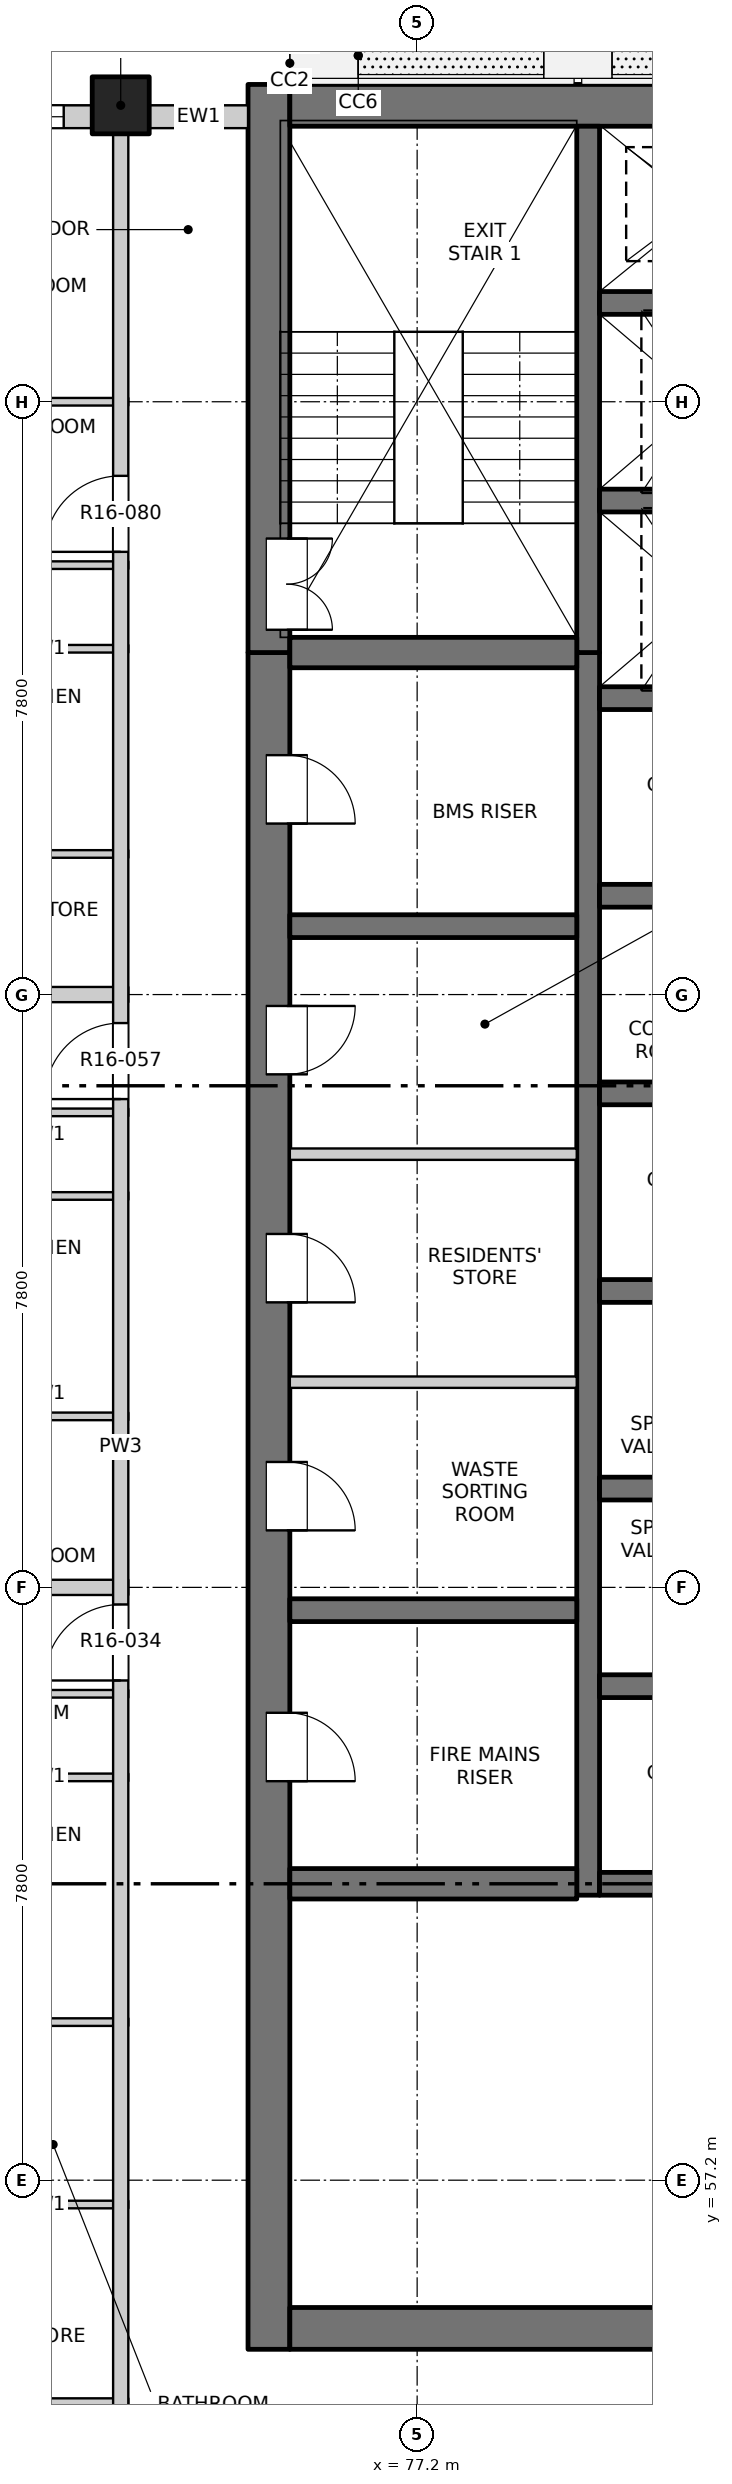
"""IFC4 building model, lengths in metres.
Left out: names, types, materials, properties, quantities, classifications, styles, units other than length and angle.
Written with IfcOpenShell. Run it as: python <this file> out.ifc"""

import sys

from ifc_helpers import new_model, si_unit, direction, frame, frame_2d, origin, origin_2d, place, context, subcontext, project, spatial, rectangle, extrude, element, fill, save


model = new_model("IFC4")
c1 = context("Model", 3, precision=1e-05, world=origin(), true_north=direction((0.0, 1.0)))
c2 = subcontext(c1, "Body", "Model", "MODEL_VIEW")
j1 = project(units=[si_unit("LENGTHUNIT", "METRE"), si_unit("PLANEANGLEUNIT", "RADIAN")], contexts=[c1])
p1 = place(None, origin())
s1 = spatial("IfcSite", under=j1, at=p1, CompositionType="ELEMENT")
p2 = place(p1, origin())
s2 = spatial("IfcBuilding", under=s1, at=p2, CompositionType="ELEMENT")
p3 = place(p2, frame((0.0, 0.0, 169.0)))
s3 = spatial("IfcBuildingStorey", under=s2, at=p3, CompositionType="ELEMENT", Elevation=169.0)
p4 = place(p3, frame((73.3, 84.5, -0.25), z_axis=(0.0, 0.0, 1.0), x_axis=(1.0, 0.0, 0.0)))
e1 = element("IfcColumn", 1, at=p4, inside=s3, PredefinedType="COLUMN", context=c2, shape_type="SweptSolid", body=[
    extrude(rectangle(XDim=0.75, YDim=0.75, at=origin_2d()), origin(), (0.0, 0.0, 1.0), 3.35),
])
p5 = place(p3, frame((75.25, 54.975, -0.25), z_axis=(0.0, 0.0, 1.0), x_axis=(0.0, 1.0, 0.0)))
e2 = element("IfcWall", 2, at=p5, inside=s3, PredefinedType="SOLIDWALL", context=c2, shape_type="SweptSolid", body=[
    extrude(rectangle(XDim=22.325, YDim=0.55, at=frame_2d((11.163, 0.0))), origin(), (0.0, 0.0, 1.0), 3.35),
])
p6 = place(p5, frame((7.475, 0.0, 0.25)))
e3 = element("IfcOpeningElement", 3, at=p6, cuts=e2, PredefinedType="OPENING", context=c2, shape_type="SweptSolid", body=[
    extrude(rectangle(XDim=0.9, YDim=2.1, at=frame_2d((0.45, 1.05))), frame((0.0, 0.285, 0.0), z_axis=(0.0, -1.0, 0.0), x_axis=(1.0, 0.0, 0.0)), (0.0, 0.0, 1.0), 0.57),
])
p7 = place(p5, frame((10.775, 0.0, 0.25)))
e4 = element("IfcOpeningElement", 4, at=p7, cuts=e2, PredefinedType="OPENING", context=c2, shape_type="SweptSolid", body=[
    extrude(rectangle(XDim=0.9, YDim=2.1, at=frame_2d((0.45, 1.05))), frame((0.0, 0.285, 0.0), z_axis=(0.0, -1.0, 0.0), x_axis=(1.0, 0.0, 0.0)), (0.0, 0.0, 1.0), 0.57),
])
p8 = place(p5, frame((13.775, 0.0, 0.25)))
e5 = element("IfcOpeningElement", 5, at=p8, cuts=e2, PredefinedType="OPENING", context=c2, shape_type="SweptSolid", body=[
    extrude(rectangle(XDim=0.9, YDim=2.1, at=frame_2d((0.45, 1.05))), frame((0.0, 0.285, 0.0), z_axis=(0.0, -1.0, 0.0), x_axis=(1.0, 0.0, 0.0)), (0.0, 0.0, 1.0), 0.57),
])
p9 = place(p5, frame((16.775, 0.0, 0.25)))
e6 = element("IfcOpeningElement", 6, at=p9, cuts=e2, PredefinedType="OPENING", context=c2, shape_type="SweptSolid", body=[
    extrude(rectangle(XDim=0.9, YDim=2.1, at=frame_2d((0.45, 1.05))), frame((0.0, 0.285, 0.0), z_axis=(0.0, -1.0, 0.0), x_axis=(1.0, 0.0, 0.0)), (0.0, 0.0, 1.0), 0.57),
])
p10 = place(p5, frame((20.075, 0.0, 0.25)))
e7 = element("IfcOpeningElement", 7, at=p10, cuts=e2, PredefinedType="OPENING", context=c2, shape_type="SweptSolid", body=[
    extrude(rectangle(XDim=0.9, YDim=2.1, at=frame_2d((0.45, 1.05))), frame((0.0, 0.285, 0.0), z_axis=(0.0, -1.0, 0.0), x_axis=(1.0, 0.0, 0.0)), (0.0, 0.0, 1.0), 0.57),
])
p11 = place(p3, frame((75.25, 77.3, -0.25), z_axis=(0.0, 0.0, 1.0), x_axis=(0.0, 1.0, 0.0)))
e8 = element("IfcWall", 8, at=p11, inside=s3, PredefinedType="SOLIDWALL", context=c2, shape_type="SweptSolid", body=[
    extrude(rectangle(XDim=7.475, YDim=0.55, at=frame_2d((3.737, 0.0))), origin(), (0.0, 0.0, 1.0), 3.35),
])
p12 = place(p11, frame((0.3, 0.0, 0.25)))
e9 = element("IfcOpeningElement", 9, at=p12, cuts=e8, PredefinedType="OPENING", context=c2, shape_type="SweptSolid", body=[
    extrude(rectangle(XDim=1.2, YDim=2.1, at=frame_2d((0.6, 1.05))), frame((0.0, 0.285, 0.0), z_axis=(0.0, -1.0, 0.0), x_axis=(1.0, 0.0, 0.0)), (0.0, 0.0, 1.0), 0.57),
])
p13 = place(p3, frame((75.525, 55.25, -0.25), z_axis=(0.0, 0.0, 1.0), x_axis=(1.0, 0.0, 0.0)))
e10 = element("IfcWall", 10, at=p13, inside=s3, PredefinedType="SOLIDWALL", context=c2, shape_type="SweptSolid", body=[
    extrude(rectangle(XDim=18.95, YDim=0.55, at=frame_2d((9.475, 0.0))), origin(), (0.0, 0.0, 1.0), 3.35),
])
p14 = place(p13, frame((8.725, 0.0, 0.25)))
e11 = element("IfcOpeningElement", 11, at=p14, cuts=e10, PredefinedType="OPENING", context=c2, shape_type="SweptSolid", body=[
    extrude(rectangle(XDim=1.5, YDim=2.1, at=frame_2d((0.75, 1.05))), frame((0.0, 0.285, 0.0), z_axis=(0.0, -1.0, 0.0), x_axis=(1.0, 0.0, 0.0)), (0.0, 0.0, 1.0), 0.57),
])
p15 = place(p3, frame((75.525, 84.5, -0.25), z_axis=(0.0, 0.0, 1.0), x_axis=(1.0, 0.0, 0.0)))
e12 = element("IfcWall", 12, at=p15, inside=s3, PredefinedType="SOLIDWALL", context=c2, shape_type="SweptSolid", body=[
    extrude(rectangle(XDim=18.95, YDim=0.55, at=frame_2d((9.475, 0.0))), origin(), (0.0, 0.0, 1.0), 3.35),
])
p16 = place(p3, frame((79.45, 60.95, -0.25), z_axis=(0.0, 0.0, 1.0), x_axis=(0.0, 1.0, 0.0)))
e13 = element("IfcWall", 13, at=p16, inside=s3, PredefinedType="SOLIDWALL", context=c2, shape_type="SweptSolid", body=[
    extrude(rectangle(XDim=16.35, YDim=0.3, at=frame_2d((8.175, 0.0))), origin(), (0.0, 0.0, 1.0), 3.35),
])
p17 = place(p3, frame((79.45, 77.3, -0.25), z_axis=(0.0, 0.0, 1.0), x_axis=(0.0, 1.0, 0.0)))
e14 = element("IfcWall", 14, at=p17, inside=s3, PredefinedType="SOLIDWALL", context=c2, shape_type="SweptSolid", body=[
    extrude(rectangle(XDim=6.925, YDim=0.3, at=frame_2d((3.462, 0.0))), origin(), (0.0, 0.0, 1.0), 3.35),
])
for number, where, z_axis, x_axis in (
    (15, (79.6, 61.1, -0.25), (0.0, 0.0, 1.0), (1.0, 0.0, 0.0)),
    (16, (79.6, 63.7, -0.25), (0.0, 0.0, 1.0), (1.0, 0.0, 0.0)),
    (17, (79.6, 66.3, -0.25), (0.0, 0.0, 1.0), (1.0, 0.0, 0.0)),
    (18, (79.6, 68.9, -0.25), (0.0, 0.0, 1.0), (1.0, 0.0, 0.0)),
    (19, (79.6, 71.5, -0.25), (0.0, 0.0, 1.0), (1.0, 0.0, 0.0)),
    (20, (79.6, 74.1, -0.25), (0.0, 0.0, 1.0), (1.0, 0.0, 0.0)),
    (21, (79.6, 76.7, -0.25), (0.0, 0.0, 1.0), (1.0, 0.0, 0.0)),
    (22, (79.6, 79.3, -0.25), (0.0, 0.0, 1.0), (1.0, 0.0, 0.0)),
    (23, (79.6, 81.9, -0.25), (0.0, 0.0, 1.0), (1.0, 0.0, 0.0)),
):
    element("IfcWall", number, at=place(p3, frame(where, z_axis=z_axis, x_axis=x_axis)), inside=s3, PredefinedType="SOLIDWALL", context=c2, shape_type="SweptSolid", body=[
        extrude(rectangle(XDim=3.0, YDim=0.3, at=frame_2d((1.5, 0.0))), origin(), (0.0, 0.0, 1.0), 3.35),
    ])
p18 = place(p3, frame((75.525, 61.1, -0.25), z_axis=(0.0, 0.0, 1.0), x_axis=(1.0, 0.0, 0.0)))
e24 = element("IfcWall", 24, at=p18, inside=s3, PredefinedType="SOLIDWALL", context=c2, shape_type="SweptSolid", body=[
    extrude(rectangle(XDim=3.775, YDim=0.4, at=frame_2d((1.888, 0.0))), origin(), (0.0, 0.0, 1.0), 3.35),
])
for number, where, z_axis, x_axis in (
    (25, (75.525, 64.7, -0.25), (0.0, 0.0, 1.0), (1.0, 0.0, 0.0)),
    (26, (75.525, 73.7, -0.25), (0.0, 0.0, 1.0), (1.0, 0.0, 0.0)),
):
    element("IfcWall", number, at=place(p3, frame(where, z_axis=z_axis, x_axis=x_axis)), inside=s3, PredefinedType="SOLIDWALL", context=c2, shape_type="SweptSolid", body=[
        extrude(rectangle(XDim=3.775, YDim=0.3, at=frame_2d((1.888, 0.0))), origin(), (0.0, 0.0, 1.0), 3.35),
    ])
p19 = place(p3, frame((75.525, 77.3, -0.25), z_axis=(0.0, 0.0, 1.0), x_axis=(1.0, 0.0, 0.0)))
e27 = element("IfcWall", 27, at=p19, inside=s3, PredefinedType="SOLIDWALL", context=c2, shape_type="SweptSolid", body=[
    extrude(rectangle(XDim=3.775, YDim=0.4, at=frame_2d((1.888, 0.0))), origin(), (0.0, 0.0, 1.0), 3.35),
])
p20 = place(p3, frame((69.4, 84.35, 0.0), z_axis=(0.0, 0.0, 1.0), x_axis=(1.0, 0.0, 0.0)))
e28 = element("IfcWall", 28, at=p20, inside=s3, PredefinedType="SOLIDWALL", context=c2, shape_type="SweptSolid", body=[
    extrude(rectangle(XDim=3.525, YDim=0.3, at=frame_2d((1.763, 0.0))), origin(), (0.0, 0.0, 1.0), 3.1),
])
p21 = place(p20, frame((0.75, 0.0, 0.9)))
e29 = element("IfcOpeningElement", 29, at=p21, cuts=e28, PredefinedType="OPENING", context=c2, shape_type="SweptSolid", body=[
    extrude(rectangle(XDim=2.4, YDim=1.8, at=frame_2d((1.2, 0.9))), frame((0.0, 0.16, 0.0), z_axis=(0.0, -1.0, 0.0), x_axis=(1.0, 0.0, 0.0)), (0.0, 0.0, 1.0), 0.32),
])
p22 = place(p3, frame((73.675, 84.35, 0.0), z_axis=(0.0, 0.0, 1.0), x_axis=(1.0, 0.0, 0.0)))
e30 = element("IfcWall", 30, at=p22, inside=s3, PredefinedType="SOLIDWALL", context=c2, shape_type="SweptSolid", body=[
    extrude(rectangle(XDim=1.3, YDim=0.3, at=frame_2d((0.65, 0.0))), origin(), (0.0, 0.0, 1.0), 3.1),
])
for number, where, z_axis, x_axis in (
    (31, (71.18, 54.28, 0.0), (0.0, 0.0, 1.0), (1.0, 0.0, 0.0)),
    (32, (71.18, 56.88, 0.0), (0.0, 0.0, 1.0), (1.0, 0.0, 0.0)),
    (33, (71.18, 59.28, 0.0), (0.0, 0.0, 1.0), (1.0, 0.0, 0.0)),
    (34, (71.18, 62.5, 0.0), (0.0, 0.0, 1.0), (1.0, 0.0, 0.0)),
    (35, (71.18, 63.6, 0.0), (0.0, 0.0, 1.0), (1.0, 0.0, 0.0)),
):
    element("IfcWall", number, at=place(p3, frame(where, z_axis=z_axis, x_axis=x_axis)), inside=s3, PredefinedType="PARTITIONING", context=c2, shape_type="SweptSolid", body=[
        extrude(rectangle(XDim=2.22, YDim=0.1, at=frame_2d((1.11, 0.0))), origin(), (0.0, 0.0, 1.0), 3.1),
    ])
p23 = place(p3, frame((65.8, 65.0, 0.0), z_axis=(0.0, 0.0, 1.0), x_axis=(1.0, 0.0, 0.0)))
e36 = element("IfcWall", 36, at=p23, inside=s3, PredefinedType="PARTITIONING", context=c2, shape_type="SweptSolid", body=[
    extrude(rectangle(XDim=7.6, YDim=0.2, at=frame_2d((3.8, 0.0))), origin(), (0.0, 0.0, 1.0), 3.1),
])
p24 = place(p3, frame((71.18, 67.25, 0.0), z_axis=(0.0, 0.0, 1.0), x_axis=(1.0, 0.0, 0.0)))
e37 = element("IfcWall", 37, at=p24, inside=s3, PredefinedType="PARTITIONING", context=c2, shape_type="SweptSolid", body=[
    extrude(rectangle(XDim=2.22, YDim=0.1, at=frame_2d((1.11, 0.0))), origin(), (0.0, 0.0, 1.0), 3.1),
])
p25 = place(p3, frame((75.525, 67.7, 0.0), z_axis=(0.0, 0.0, 1.0), x_axis=(1.0, 0.0, 0.0)))
e38 = element("IfcWall", 38, at=p25, inside=s3, PredefinedType="PARTITIONING", context=c2, shape_type="SweptSolid", body=[
    extrude(rectangle(XDim=3.775, YDim=0.15, at=frame_2d((1.887, 0.0))), origin(), (0.0, 0.0, 1.0), 3.1),
])
p26 = place(p3, frame((71.18, 70.15, 0.0), z_axis=(0.0, 0.0, 1.0), x_axis=(1.0, 0.0, 0.0)))
e39 = element("IfcWall", 39, at=p26, inside=s3, PredefinedType="PARTITIONING", context=c2, shape_type="SweptSolid", body=[
    extrude(rectangle(XDim=2.22, YDim=0.1, at=frame_2d((1.11, 0.0))), origin(), (0.0, 0.0, 1.0), 3.1),
])
p27 = place(p3, frame((75.525, 70.7, 0.0), z_axis=(0.0, 0.0, 1.0), x_axis=(1.0, 0.0, 0.0)))
e40 = element("IfcWall", 40, at=p27, inside=s3, PredefinedType="PARTITIONING", context=c2, shape_type="SweptSolid", body=[
    extrude(rectangle(XDim=3.775, YDim=0.15, at=frame_2d((1.887, 0.0))), origin(), (0.0, 0.0, 1.0), 3.1),
])
p28 = place(p3, frame((71.18, 71.25, 0.0), z_axis=(0.0, 0.0, 1.0), x_axis=(1.0, 0.0, 0.0)))
e41 = element("IfcWall", 41, at=p28, inside=s3, PredefinedType="PARTITIONING", context=c2, shape_type="SweptSolid", body=[
    extrude(rectangle(XDim=2.22, YDim=0.1, at=frame_2d((1.11, 0.0))), origin(), (0.0, 0.0, 1.0), 3.1),
])
p29 = place(p3, frame((65.8, 72.8, 0.0), z_axis=(0.0, 0.0, 1.0), x_axis=(1.0, 0.0, 0.0)))
e42 = element("IfcWall", 42, at=p29, inside=s3, PredefinedType="PARTITIONING", context=c2, shape_type="SweptSolid", body=[
    extrude(rectangle(XDim=7.6, YDim=0.2, at=frame_2d((3.8, 0.0))), origin(), (0.0, 0.0, 1.0), 3.1),
])
for number, where, z_axis, x_axis in (
    (43, (71.18, 74.65, 0.0), (0.0, 0.0, 1.0), (1.0, 0.0, 0.0)),
    (44, (71.18, 77.35, 0.0), (0.0, 0.0, 1.0), (1.0, 0.0, 0.0)),
    (45, (71.18, 78.45, 0.0), (0.0, 0.0, 1.0), (1.0, 0.0, 0.0)),
):
    element("IfcWall", number, at=place(p3, frame(where, z_axis=z_axis, x_axis=x_axis)), inside=s3, PredefinedType="PARTITIONING", context=c2, shape_type="SweptSolid", body=[
        extrude(rectangle(XDim=2.22, YDim=0.1, at=frame_2d((1.11, 0.0))), origin(), (0.0, 0.0, 1.0), 3.1),
    ])
p30 = place(p3, frame((65.8, 80.6, 0.0), z_axis=(0.0, 0.0, 1.0), x_axis=(1.0, 0.0, 0.0)))
e46 = element("IfcWall", 46, at=p30, inside=s3, PredefinedType="PARTITIONING", context=c2, shape_type="SweptSolid", body=[
    extrude(rectangle(XDim=7.6, YDim=0.1, at=frame_2d((3.8, 0.0))), origin(), (0.0, 0.0, 1.0), 3.1),
])
p31 = place(p30, frame((4.14, 0.0, 0.0)))
e47 = element("IfcOpeningElement", 47, at=p31, cuts=e46, PredefinedType="OPENING", context=c2, shape_type="SweptSolid", body=[
    extrude(rectangle(XDim=0.9, YDim=2.1, at=frame_2d((0.45, 1.05))), frame((0.0, 0.06, 0.0), z_axis=(0.0, -1.0, 0.0), x_axis=(1.0, 0.0, 0.0)), (0.0, 0.0, 1.0), 0.12),
])
p32 = place(p3, frame((73.3, 49.5, 0.0), z_axis=(0.0, 0.0, 1.0), x_axis=(0.0, 1.0, 0.0)))
e48 = element("IfcWall", 48, at=p32, inside=s3, PredefinedType="PARTITIONING", context=c2, shape_type="SweptSolid", body=[
    extrude(rectangle(XDim=34.7, YDim=0.2, at=frame_2d((17.35, 0.0))), origin(), (0.0, 0.0, 1.0), 3.1),
])
p33 = place(p32, frame((14.275, 0.0, 0.0)))
e49 = element("IfcOpeningElement", 49, at=p33, cuts=e48, PredefinedType="OPENING", context=c2, shape_type="SweptSolid", body=[
    extrude(rectangle(XDim=1.0, YDim=2.1, at=frame_2d((0.5, 1.05))), frame((0.0, 0.11, 0.0), z_axis=(0.0, -1.0, 0.0), x_axis=(1.0, 0.0, 0.0)), (0.0, 0.0, 1.0), 0.22),
])
p34 = place(p32, frame((21.925, 0.0, 0.0)))
e50 = element("IfcOpeningElement", 50, at=p34, cuts=e48, PredefinedType="OPENING", context=c2, shape_type="SweptSolid", body=[
    extrude(rectangle(XDim=1.0, YDim=2.1, at=frame_2d((0.5, 1.05))), frame((0.0, 0.11, 0.0), z_axis=(0.0, -1.0, 0.0), x_axis=(1.0, 0.0, 0.0)), (0.0, 0.0, 1.0), 0.22),
])
p35 = place(p32, frame((29.125, 0.0, 0.0)))
e51 = element("IfcOpeningElement", 51, at=p35, cuts=e48, PredefinedType="OPENING", context=c2, shape_type="SweptSolid", body=[
    extrude(rectangle(XDim=1.0, YDim=2.1, at=frame_2d((0.5, 1.05))), frame((0.0, 0.11, 0.0), z_axis=(0.0, -1.0, 0.0), x_axis=(1.0, 0.0, 0.0)), (0.0, 0.0, 1.0), 0.22),
])
p36 = place(p21, origin())
e52 = element("IfcWindow", 52, at=p36, inside=s3, PartitioningType="DOUBLE_PANEL_VERTICAL", PredefinedType="WINDOW", context=c2, shape_type="SweptSolid", body=[
    extrude(rectangle(XDim=2.4, YDim=1.8, at=frame_2d((1.2, 0.9))), frame((0.0, 0.03, 0.0), z_axis=(0.0, -1.0, 0.0), x_axis=(1.0, 0.0, 0.0)), (0.0, 0.0, 1.0), 0.06),
])
fill(e29, e52)
p37 = place(p6, origin())
e53 = element("IfcDoor", 53, at=p37, inside=s3, OperationType="SINGLE_SWING_RIGHT", PredefinedType="DOOR", context=c2, shape_type="SweptSolid", body=[
    extrude(rectangle(XDim=0.9, YDim=2.1, at=frame_2d((0.45, 1.05))), frame((0.0, -0.21, 0.0), z_axis=(0.0, -1.0, 0.0), x_axis=(1.0, 0.0, 0.0)), (0.0, 0.0, 1.0), 0.05),
])
fill(e3, e53)
p38 = place(p33, origin())
e54 = element("IfcDoor", 54, at=p38, inside=s3, OperationType="SINGLE_SWING_RIGHT", PredefinedType="DOOR", context=c2, shape_type="SweptSolid", body=[
    extrude(rectangle(XDim=1.0, YDim=2.1, at=frame_2d((0.5, 1.05))), frame((0.0, 0.025, 0.0), z_axis=(0.0, -1.0, 0.0), x_axis=(1.0, 0.0, 0.0)), (0.0, 0.0, 1.0), 0.05),
])
fill(e49, e54)
p39 = place(p7, origin())
e55 = element("IfcDoor", 55, at=p39, inside=s3, OperationType="SINGLE_SWING_RIGHT", PredefinedType="DOOR", context=c2, shape_type="SweptSolid", body=[
    extrude(rectangle(XDim=0.9, YDim=2.1, at=frame_2d((0.45, 1.05))), frame((0.0, -0.21, 0.0), z_axis=(0.0, -1.0, 0.0), x_axis=(1.0, 0.0, 0.0)), (0.0, 0.0, 1.0), 0.05),
])
fill(e4, e55)
p40 = place(p8, origin())
e56 = element("IfcDoor", 56, at=p40, inside=s3, OperationType="SINGLE_SWING_RIGHT", PredefinedType="DOOR", context=c2, shape_type="SweptSolid", body=[
    extrude(rectangle(XDim=0.9, YDim=2.1, at=frame_2d((0.45, 1.05))), frame((0.0, -0.21, 0.0), z_axis=(0.0, -1.0, 0.0), x_axis=(1.0, 0.0, 0.0)), (0.0, 0.0, 1.0), 0.05),
])
fill(e5, e56)
p41 = place(p34, origin())
e57 = element("IfcDoor", 57, at=p41, inside=s3, OperationType="SINGLE_SWING_RIGHT", PredefinedType="DOOR", context=c2, shape_type="SweptSolid", body=[
    extrude(rectangle(XDim=1.0, YDim=2.1, at=frame_2d((0.5, 1.05))), frame((0.0, 0.025, 0.0), z_axis=(0.0, -1.0, 0.0), x_axis=(1.0, 0.0, 0.0)), (0.0, 0.0, 1.0), 0.05),
])
fill(e50, e57)
p42 = place(p9, origin())
e58 = element("IfcDoor", 58, at=p42, inside=s3, OperationType="SINGLE_SWING_LEFT", PredefinedType="DOOR", context=c2, shape_type="SweptSolid", body=[
    extrude(rectangle(XDim=0.9, YDim=2.1, at=frame_2d((0.45, 1.05))), frame((0.0, -0.21, 0.0), z_axis=(0.0, -1.0, 0.0), x_axis=(1.0, 0.0, 0.0)), (0.0, 0.0, 1.0), 0.05),
])
fill(e6, e58)
p43 = place(p10, origin())
e59 = element("IfcDoor", 59, at=p43, inside=s3, OperationType="SINGLE_SWING_RIGHT", PredefinedType="DOOR", context=c2, shape_type="SweptSolid", body=[
    extrude(rectangle(XDim=0.9, YDim=2.1, at=frame_2d((0.45, 1.05))), frame((0.0, -0.21, 0.0), z_axis=(0.0, -1.0, 0.0), x_axis=(1.0, 0.0, 0.0)), (0.0, 0.0, 1.0), 0.05),
])
fill(e7, e59)
p44 = place(p12, origin())
e60 = element("IfcDoor", 60, at=p44, inside=s3, OperationType="DOUBLE_DOOR_SINGLE_SWING", PredefinedType="DOOR", context=c2, shape_type="SweptSolid", body=[
    extrude(rectangle(XDim=1.2, YDim=2.1, at=frame_2d((0.6, 1.05))), frame((0.0, -0.21, 0.0), z_axis=(0.0, -1.0, 0.0), x_axis=(1.0, 0.0, 0.0)), (0.0, 0.0, 1.0), 0.05),
])
fill(e9, e60)
p45 = place(p35, origin())
e61 = element("IfcDoor", 61, at=p45, inside=s3, OperationType="SINGLE_SWING_RIGHT", PredefinedType="DOOR", context=c2, shape_type="SweptSolid", body=[
    extrude(rectangle(XDim=1.0, YDim=2.1, at=frame_2d((0.5, 1.05))), frame((0.0, 0.025, 0.0), z_axis=(0.0, -1.0, 0.0), x_axis=(1.0, 0.0, 0.0)), (0.0, 0.0, 1.0), 0.05),
])
fill(e51, e61)
save(model, sys.argv[1])
